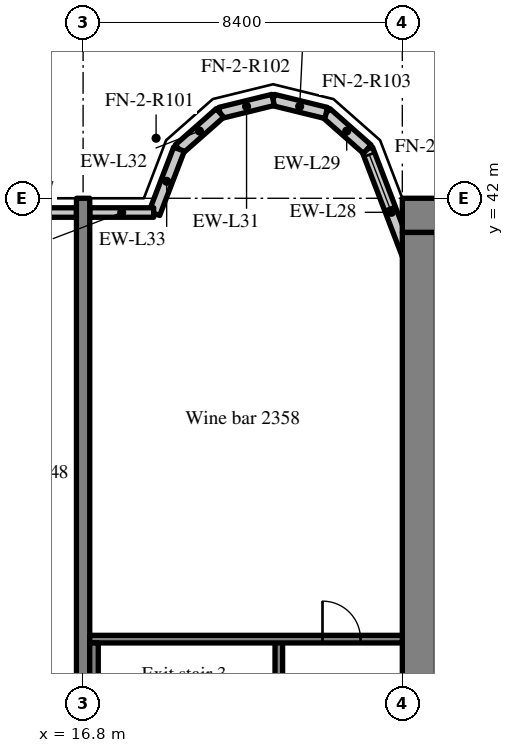
"""IFC4 building model, lengths in metres.
Left out: names, types, materials, properties, quantities, classifications, styles, units other than length and angle.
Written with IfcOpenShell. Run it as: python <this file> out.ifc"""

import sys

from ifc_helpers import new_model, si_unit, direction, frame, frame_2d, origin, place, context, subcontext, project, spatial, rectangle, extrude, source, transform, mapped, element, fill, save


model = new_model("IFC4")
c1 = context("Model", 3, precision=1e-05, world=origin(), true_north=direction((0.0, 1.0)))
c2 = subcontext(c1, "Body", "Model", "MODEL_VIEW")
j1 = project(units=[si_unit("LENGTHUNIT", "METRE"), si_unit("PLANEANGLEUNIT", "RADIAN")], contexts=[c1])
p1 = place(None, origin())
s1 = spatial("IfcSite", under=j1, at=p1, CompositionType="ELEMENT")
p2 = place(p1, origin())
s2 = spatial("IfcBuilding", under=s1, at=p2, CompositionType="ELEMENT")
p3 = place(p2, frame((0.0, 0.0, 99.0)))
s3 = spatial("IfcBuildingStorey", under=s2, at=p3, CompositionType="ELEMENT", Elevation=99.0)
m1 = source(origin(), c2, "Body", "SweptSolid", [
    extrude(rectangle(XDim=50.4, YDim=0.9, at=frame_2d((25.2, 0.0))), origin(), (0.0, 0.0, 1.0), 3.52),
])
p4 = place(p3, frame((25.2, 41.55, 0.0), z_axis=(0.0, 0.0, 1.0), x_axis=(1.0, 0.0, 0.0)))
e1 = element("IfcWall", 1, at=p4, inside=s3, PredefinedType="SHEAR", context=c2, shape_type="MappedRepresentation", body=[
    mapped(m1, transform((0.0, 0.0, 0.0), scale=1.0)),
])
m2 = source(origin(), c2, "Body", "SweptSolid", [
    extrude(rectangle(XDim=18.2, YDim=0.9, at=frame_2d((9.1, 0.0))), origin(), (0.0, 0.0, 1.0), 3.52),
])
p5 = place(p3, frame((25.65, 22.9, 0.0), z_axis=(0.0, 0.0, 1.0), x_axis=(0.0, 1.0, 0.0)))
e2 = element("IfcWall", 2, at=p5, inside=s3, PredefinedType="SHEAR", context=c2, shape_type="MappedRepresentation", body=[
    mapped(m2, transform((0.0, 0.0, 0.0), scale=1.0)),
])
m3 = source(origin(), c2, "Body", "SweptSolid", [
    extrude(rectangle(XDim=20.0, YDim=0.35, at=frame_2d((10.0, 0.0))), origin(), (0.0, 0.0, 1.0), 3.52),
])
p6 = place(p3, frame((16.8, 22.0, 0.0), z_axis=(0.0, 0.0, 1.0), x_axis=(0.0, 1.0, 0.0)))
e3 = element("IfcWall", 3, at=p6, inside=s3, PredefinedType="SHEAR", context=c2, shape_type="MappedRepresentation", body=[
    mapped(m3, transform((0.0, 0.0, 0.0), scale=1.0)),
])
m4 = source(origin(), c2, "Body", "SweptSolid", [
    extrude(rectangle(XDim=3.559, YDim=0.3, at=frame_2d((1.78, 0.0))), origin(), (0.0, 0.0, 1.0), 3.52),
])
p7 = place(p3, frame((25.55, 39.969, 0.0), z_axis=(0.0, 0.0, 1.0), x_axis=(-0.35779745313, 0.933799219604, 0.0)))
e4 = element("IfcWall", 4, at=p7, inside=s3, PredefinedType="SOLIDWALL", context=c2, shape_type="MappedRepresentation", body=[
    mapped(m4, transform((0.0, 0.0, 0.0), scale=1.0)),
])
m5 = source(origin(), c2, "Body", "SweptSolid", [
    extrude(rectangle(XDim=1.5, YDim=2.0, at=frame_2d((0.75, 1.0))), frame((0.0, 0.16, 0.0), z_axis=(0.0, -1.0, 0.0), x_axis=(1.0, 0.0, 0.0)), (0.0, 0.0, 1.0), 0.32),
])
p8 = place(p7, frame((1.903, 0.0, 0.9)))
e5 = element("IfcOpeningElement", 5, at=p8, cuts=e4, PredefinedType="OPENING", context=c2, shape_type="MappedRepresentation", body=[
    mapped(m5, transform((0.0, 0.0, 0.0), scale=1.0)),
])
m6 = source(origin(), c2, "Body", "SweptSolid", [
    extrude(rectangle(XDim=1.44, YDim=0.3, at=frame_2d((0.72, 0.0))), origin(), (0.0, 0.0, 1.0), 3.52),
])
p9 = place(p3, frame((24.277, 43.292, 0.0), z_axis=(0.0, 0.0, 1.0), x_axis=(-0.749649827867, 0.661834673902, 0.0)))
e6 = element("IfcWall", 6, at=p9, inside=s3, PredefinedType="SOLIDWALL", context=c2, shape_type="MappedRepresentation", body=[
    mapped(m6, transform((0.0, 0.0, 0.0), scale=1.0)),
])
m7 = source(origin(), c2, "Body", "SweptSolid", [
    extrude(rectangle(XDim=1.438, YDim=0.3, at=frame_2d((0.719, 0.0))), origin(), (0.0, 0.0, 1.0), 3.52),
])
p10 = place(p3, frame((23.197, 44.245, 0.0), z_axis=(0.0, 0.0, 1.0), x_axis=(-0.971152283879, 0.238460146601, 0.0)))
e7 = element("IfcWall", 7, at=p10, inside=s3, PredefinedType="SOLIDWALL", context=c2, shape_type="MappedRepresentation", body=[
    mapped(m7, transform((0.0, 0.0, 0.0), scale=1.0)),
])
m8 = source(origin(), c2, "Body", "SweptSolid", [
    extrude(rectangle(XDim=1.439, YDim=0.3, at=frame_2d((0.719, 0.0))), origin(), (0.0, 0.0, 1.0), 3.52),
])
p11 = place(p3, frame((21.8, 44.588, 0.0), z_axis=(0.0, 0.0, 1.0), x_axis=(-0.971161932466, -0.238420848351, 0.0)))
e8 = element("IfcWall", 8, at=p11, inside=s3, PredefinedType="SOLIDWALL", context=c2, shape_type="MappedRepresentation", body=[
    mapped(m8, transform((0.0, 0.0, 0.0), scale=1.0)),
])
m9 = source(origin(), c2, "Body", "SweptSolid", [
    extrude(rectangle(XDim=1.44, YDim=0.3, at=frame_2d((0.72, 0.0))), origin(), (0.0, 0.0, 1.0), 3.52),
])
p12 = place(p3, frame((20.403, 44.245, 0.0), z_axis=(0.0, 0.0, 1.0), x_axis=(-0.74957555648, -0.661918790432, 0.0)))
e9 = element("IfcWall", 9, at=p12, inside=s3, PredefinedType="SOLIDWALL", context=c2, shape_type="MappedRepresentation", body=[
    mapped(m9, transform((0.0, 0.0, 0.0), scale=1.0)),
])
m10 = source(origin(), c2, "Body", "SweptSolid", [
    extrude(rectangle(XDim=1.812, YDim=0.3, at=frame_2d((0.906, 0.0))), origin(), (0.0, 0.0, 1.0), 3.52),
])
p13 = place(p3, frame((19.323, 43.292, 0.0), z_axis=(0.0, 0.0, 1.0), x_axis=(-0.357877270961, -0.93376863244, 0.0)))
e10 = element("IfcWall", 10, at=p13, inside=s3, PredefinedType="SOLIDWALL", context=c2, shape_type="MappedRepresentation", body=[
    mapped(m10, transform((0.0, 0.0, 0.0), scale=1.0)),
])
m11 = source(origin(), c2, "Body", "SweptSolid", [
    extrude(rectangle(XDim=3.675, YDim=0.25, at=frame_2d((1.837, 0.0))), origin(), (0.0, 0.0, 1.0), 2.82),
])
p14 = place(p3, frame((16.625, 41.625, 0.0), z_axis=(0.0, 0.0, 1.0), x_axis=(-1.0, 0.0, 0.0)))
e11 = element("IfcWall", 11, at=p14, inside=s3, PredefinedType="SOLIDWALL", context=c2, shape_type="MappedRepresentation", body=[
    mapped(m11, transform((0.0, 0.0, 0.0), scale=1.0)),
])
m12 = source(origin(), c2, "Body", "SweptSolid", [
    extrude(rectangle(XDim=1.5, YDim=1.5, at=frame_2d((0.75, 0.75))), frame((0.0, 0.135, 0.0), z_axis=(0.0, -1.0, 0.0), x_axis=(1.0, 0.0, 0.0)), (0.0, 0.0, 1.0), 0.27),
])
p15 = place(p14, frame((1.087, 0.0, 0.9)))
e12 = element("IfcOpeningElement", 12, at=p15, cuts=e11, PredefinedType="OPENING", context=c2, shape_type="MappedRepresentation", body=[
    mapped(m12, transform((0.0, 0.0, 0.0), scale=1.0)),
])
m13 = source(origin(), c2, "Body", "SweptSolid", [
    extrude(rectangle(XDim=1.683, YDim=0.25, at=frame_2d((0.841, 0.0))), origin(), (0.0, 0.0, 1.0), 2.82),
])
p16 = place(p3, frame((18.658, 41.625, 0.0), z_axis=(0.0, 0.0, 1.0), x_axis=(-1.0, 0.0, 0.0)))
e13 = element("IfcWall", 13, at=p16, inside=s3, PredefinedType="SOLIDWALL", context=c2, shape_type="MappedRepresentation", body=[
    mapped(m13, transform((0.0, 0.0, 0.0), scale=1.0)),
])
m14 = source(origin(), c2, "Body", "SweptSolid", [
    extrude(rectangle(XDim=8.3, YDim=0.2, at=frame_2d((4.15, 0.0))), origin(), (0.0, 0.0, 1.0), 3.52),
])
p17 = place(p3, frame((21.95, 22.1, 0.0), z_axis=(0.0, 0.0, 1.0), x_axis=(0.0, 1.0, 0.0)))
e14 = element("IfcWall", 14, at=p17, inside=s3, PredefinedType="SOLIDWALL", context=c2, shape_type="MappedRepresentation", body=[
    mapped(m14, transform((0.0, 0.0, 0.0), scale=1.0)),
])
m15 = source(origin(), c2, "Body", "SweptSolid", [
    extrude(rectangle(XDim=1.2, YDim=2.1, at=frame_2d((0.6, 1.05))), frame((0.0, 0.11, 0.0), z_axis=(0.0, -1.0, 0.0), x_axis=(1.0, 0.0, 0.0)), (0.0, 0.0, 1.0), 0.22),
])
p18 = place(p17, frame((0.6, 0.0, 0.0)))
e15 = element("IfcOpeningElement", 15, at=p18, cuts=e14, PredefinedType="OPENING", context=c2, shape_type="MappedRepresentation", body=[
    mapped(m15, transform((0.0, 0.0, 0.0), scale=1.0)),
])
m16 = source(origin(), c2, "Body", "SweptSolid", [
    extrude(rectangle(XDim=8.225, YDim=0.2, at=frame_2d((4.112, 0.0))), origin(), (0.0, 0.0, 1.0), 3.52),
])
p19 = place(p3, frame((16.975, 30.4, 0.0), z_axis=(0.0, 0.0, 1.0), x_axis=(1.0, 0.0, 0.0)))
e16 = element("IfcWall", 16, at=p19, inside=s3, PredefinedType="SOLIDWALL", context=c2, shape_type="MappedRepresentation", body=[
    mapped(m16, transform((0.0, 0.0, 0.0), scale=1.0)),
])
m17 = source(origin(), c2, "Body", "SweptSolid", [
    extrude(rectangle(XDim=1.0, YDim=2.1, at=frame_2d((0.5, 1.05))), frame((0.0, 0.11, 0.0), z_axis=(0.0, -1.0, 0.0), x_axis=(1.0, 0.0, 0.0)), (0.0, 0.0, 1.0), 0.22),
])
p20 = place(p19, frame((6.125, 0.0, 0.0)))
e17 = element("IfcOpeningElement", 17, at=p20, cuts=e16, PredefinedType="OPENING", context=c2, shape_type="MappedRepresentation", body=[
    mapped(m17, transform((0.0, 0.0, 0.0), scale=1.0)),
])
m18 = source(origin(), c2, "Body", "SweptSolid", [
    extrude(rectangle(XDim=8.1, YDim=0.225, at=frame_2d((4.05, 0.0))), origin(), (0.0, 0.0, 1.0), 3.52),
])
p21 = place(p3, frame((17.087, 22.2, 0.0), z_axis=(0.0, 0.0, 1.0), x_axis=(0.0, 1.0, 0.0)))
e18 = element("IfcWall", 18, at=p21, inside=s3, PredefinedType="SOLIDWALL", context=c2, shape_type="MappedRepresentation", body=[
    mapped(m18, transform((0.0, 0.0, 0.0), scale=1.0)),
])
m19 = source(origin(), c2, "Body", "SweptSolid", [
    extrude(rectangle(XDim=1.5, YDim=2.0, at=frame_2d((0.75, 1.0))), frame((0.0, 0.03, 0.0), z_axis=(0.0, -1.0, 0.0), x_axis=(1.0, 0.0, 0.0)), (0.0, 0.0, 1.0), 0.06),
])
p22 = place(p8, origin())
e19 = element("IfcWindow", 19, at=p22, inside=s3, PartitioningType="SINGLE_PANEL", PredefinedType="WINDOW", context=c2, shape_type="MappedRepresentation", body=[
    mapped(m19, transform((0.0, 0.0, 0.0), scale=1.0)),
])
fill(e5, e19)
m20 = source(origin(), c2, "Body", "SweptSolid", [
    extrude(rectangle(XDim=1.0, YDim=2.1, at=frame_2d((0.5, 1.05))), frame((0.0, 0.025, 0.0), z_axis=(0.0, -1.0, 0.0), x_axis=(1.0, 0.0, 0.0)), (0.0, 0.0, 1.0), 0.05),
])
p23 = place(p20, origin())
e20 = element("IfcDoor", 20, at=p23, inside=s3, OperationType="SINGLE_SWING_LEFT", PredefinedType="DOOR", context=c2, shape_type="MappedRepresentation", body=[
    mapped(m20, transform((0.0, 0.0, 0.0), scale=1.0)),
])
fill(e17, e20)
save(model, sys.argv[1])
